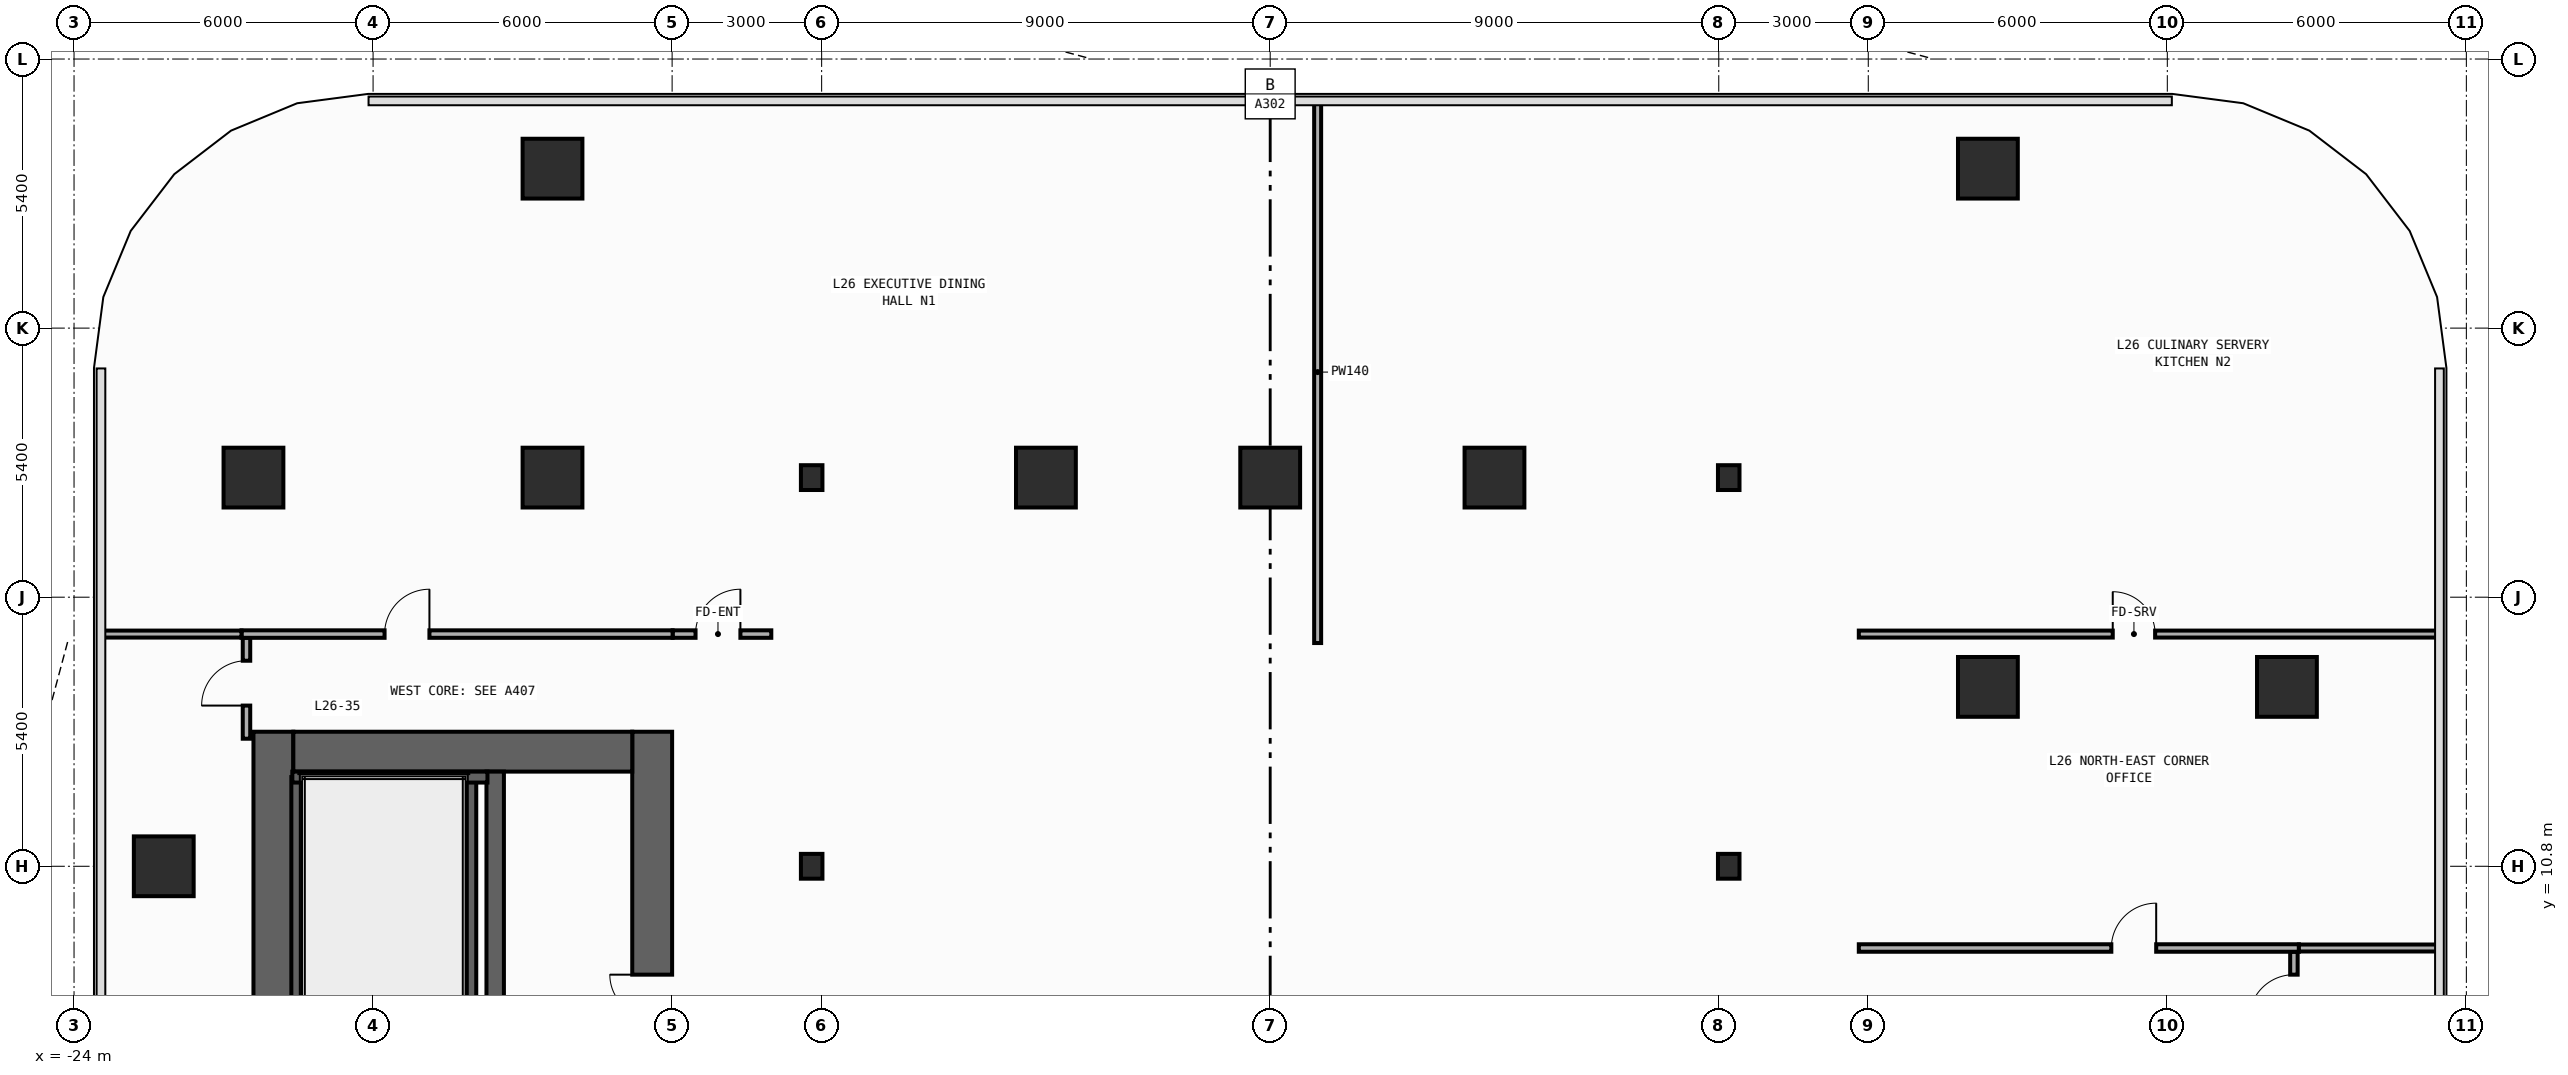
"""IFC4 building model, lengths in metres.
Left out: names, types, materials, properties, quantities, classifications, styles, units other than length and angle.
Written with IfcOpenShell. Run it as: python <this file> out.ifc"""

import sys

from ifc_helpers import new_model, si_unit, direction, frame, frame_2d, origin, origin_2d, place, context, subcontext, project, spatial, rectangle, i_section, extrude, element, fill, save


model = new_model("IFC4")
c1 = context("Model", 3, precision=1e-05, world=origin(), true_north=direction((0.0, 1.0)))
c2 = subcontext(c1, "Body", "Model", "MODEL_VIEW")
j1 = project(units=[si_unit("LENGTHUNIT", "METRE"), si_unit("PLANEANGLEUNIT", "RADIAN")], contexts=[c1])
p1 = place(None, origin())
s1 = spatial("IfcSite", under=j1, at=p1, CompositionType="ELEMENT")
p2 = place(p1, origin())
s2 = spatial("IfcBuilding", under=s1, at=p2, CompositionType="ELEMENT")
p3 = place(p2, frame((0.0, 0.0, 114.2)))
s3 = spatial("IfcBuildingStorey", under=s2, at=p3, CompositionType="ELEMENT", Elevation=114.2)
p4 = place(p3, frame((-20.0, -13.5, 0.0), z_axis=(0.0, 0.0, 1.0), x_axis=(0.0, 1.0, 0.0)))
e1 = element("IfcWall", 1, at=p4, inside=s3, PredefinedType="SHEAR", context=c2, shape_type="SweptSolid", body=[
    extrude(rectangle(XDim=27.0, YDim=0.8, at=frame_2d((13.5, 0.0))), origin(), (0.0, 0.0, 1.0), 3.94),
])
p5 = place(p3, frame((-12.4, -13.5, 0.0), z_axis=(0.0, 0.0, 1.0), x_axis=(0.0, 1.0, 0.0)))
e2 = element("IfcWall", 2, at=p5, inside=s3, PredefinedType="SHEAR", context=c2, shape_type="SweptSolid", body=[
    extrude(rectangle(XDim=27.0, YDim=0.8, at=frame_2d((13.5, 0.0))), origin(), (0.0, 0.0, 1.0), 3.94),
])
p6 = place(p5, frame((10.35, 0.0, 0.0)))
e3 = element("IfcOpeningElement", 3, at=p6, cuts=e2, PredefinedType="OPENING", context=c2, shape_type="SweptSolid", body=[
    extrude(rectangle(XDim=1.1, YDim=2.2, at=frame_2d((0.55, 1.1))), frame((0.0, 0.41, 0.0), z_axis=(0.0, -1.0, 0.0), x_axis=(1.0, 0.0, 0.0)), (0.0, 0.0, 1.0), 0.82),
])
p7 = place(p5, frame((7.15, 0.0, 0.0)))
e4 = element("IfcOpeningElement", 4, at=p7, cuts=e2, PredefinedType="OPENING", context=c2, shape_type="SweptSolid", body=[
    extrude(rectangle(XDim=1.1, YDim=2.2, at=frame_2d((0.55, 1.1))), frame((0.0, 0.41, 0.0), z_axis=(0.0, -1.0, 0.0), x_axis=(1.0, 0.0, 0.0)), (0.0, 0.0, 1.0), 0.82),
])
p8 = place(p5, frame((3.95, 0.0, 0.0)))
e5 = element("IfcOpeningElement", 5, at=p8, cuts=e2, PredefinedType="OPENING", context=c2, shape_type="SweptSolid", body=[
    extrude(rectangle(XDim=1.1, YDim=2.2, at=frame_2d((0.55, 1.1))), frame((0.0, 0.41, 0.0), z_axis=(0.0, -1.0, 0.0), x_axis=(1.0, 0.0, 0.0)), (0.0, 0.0, 1.0), 0.82),
])
p9 = place(p5, frame((15.175, 0.0, 0.0)))
e6 = element("IfcOpeningElement", 6, at=p9, cuts=e2, PredefinedType="OPENING", context=c2, shape_type="SweptSolid", body=[
    extrude(rectangle(XDim=0.85, YDim=2.1, at=frame_2d((0.425, 1.05))), frame((0.0, 0.41, 0.0), z_axis=(0.0, -1.0, 0.0), x_axis=(1.0, 0.0, 0.0)), (0.0, 0.0, 1.0), 0.82),
])
p10 = place(p5, frame((21.275, 0.0, 0.0)))
e7 = element("IfcOpeningElement", 7, at=p10, cuts=e2, PredefinedType="OPENING", context=c2, shape_type="SweptSolid", body=[
    extrude(rectangle(XDim=0.85, YDim=2.1, at=frame_2d((0.425, 1.05))), frame((0.0, 0.41, 0.0), z_axis=(0.0, -1.0, 0.0), x_axis=(1.0, 0.0, 0.0)), (0.0, 0.0, 1.0), 0.82),
])
p11 = place(p5, frame((12.725, 0.0, 0.0)))
e8 = element("IfcOpeningElement", 8, at=p11, cuts=e2, PredefinedType="OPENING", context=c2, shape_type="SweptSolid", body=[
    extrude(rectangle(XDim=1.15, YDim=2.2, at=frame_2d((0.575, 1.1))), frame((0.0, 0.41, 0.0), z_axis=(0.0, -1.0, 0.0), x_axis=(1.0, 0.0, 0.0)), (0.0, 0.0, 1.0), 0.82),
])
p12 = place(p5, frame((1.625, 0.0, 0.0)))
e9 = element("IfcOpeningElement", 9, at=p12, cuts=e2, PredefinedType="OPENING", context=c2, shape_type="SweptSolid", body=[
    extrude(rectangle(XDim=0.85, YDim=2.1, at=frame_2d((0.425, 1.05))), frame((0.0, 0.41, 0.0), z_axis=(0.0, -1.0, 0.0), x_axis=(1.0, 0.0, 0.0)), (0.0, 0.0, 1.0), 0.82),
])
p13 = place(p3, frame((-19.6, 13.1, 0.0), z_axis=(0.0, 0.0, 1.0), x_axis=(1.0, 0.0, 0.0)))
e10 = element("IfcWall", 10, at=p13, inside=s3, PredefinedType="SHEAR", context=c2, shape_type="SweptSolid", body=[
    extrude(rectangle(XDim=6.8, YDim=0.8, at=frame_2d((3.4, 0.0))), origin(), (0.0, 0.0, 1.0), 3.94),
])
p14 = place(p3, frame((-15.55, -12.7, 0.0), z_axis=(0.0, 0.0, 1.0), x_axis=(0.0, 1.0, 0.0)))
e11 = element("IfcWall", 11, at=p14, inside=s3, PredefinedType="SHEAR", context=c2, shape_type="SweptSolid", body=[
    extrude(rectangle(XDim=25.4, YDim=0.35, at=frame_2d((12.7, 0.0))), origin(), (0.0, 0.0, 1.0), 3.94),
])
p15 = place(p14, frame((11.925, 0.0, 0.0)))
e12 = element("IfcOpeningElement", 12, at=p15, cuts=e11, PredefinedType="OPENING", context=c2, shape_type="SweptSolid", body=[
    extrude(rectangle(XDim=1.15, YDim=2.2, at=frame_2d((0.575, 1.1))), frame((0.0, 0.185, 0.0), z_axis=(0.0, -1.0, 0.0), x_axis=(1.0, 0.0, 0.0)), (0.0, 0.0, 1.0), 0.37),
])
p16 = place(p14, frame((0.825, 0.0, 0.0)))
e13 = element("IfcOpeningElement", 13, at=p16, cuts=e11, PredefinedType="OPENING", context=c2, shape_type="SweptSolid", body=[
    extrude(rectangle(XDim=0.85, YDim=2.1, at=frame_2d((0.425, 1.05))), frame((0.0, 0.185, 0.0), z_axis=(0.0, -1.0, 0.0), x_axis=(1.0, 0.0, 0.0)), (0.0, 0.0, 1.0), 0.37),
])
for number, where, z_axis, x_axis in (
    (14, (-16.04, 1.29, 0.0), (0.0, 0.0, 1.0), (0.0, 1.0, 0.0)),
    (15, (-19.53, 1.29, 0.0), (0.0, 0.0, 1.0), (0.0, 1.0, 0.0)),
):
    element("IfcWall", number, at=place(p3, frame(where, z_axis=z_axis, x_axis=x_axis)), inside=s3, PredefinedType="SHEAR", context=c2, shape_type="SweptSolid", body=[
        extrude(rectangle(XDim=11.3, YDim=0.22, at=frame_2d((5.65, 0.0))), origin(), (0.0, 0.0, 1.0), 3.94),
    ])
p17 = place(p3, frame((-19.62, 12.59, 0.0), z_axis=(0.0, 0.0, 1.0), x_axis=(1.0, 0.0, 0.0)))
e16 = element("IfcWall", 16, at=p17, inside=s3, PredefinedType="SHEAR", context=c2, shape_type="SweptSolid", body=[
    extrude(rectangle(XDim=3.915, YDim=0.22, at=frame_2d((1.958, 0.0))), origin(), (0.0, 0.0, 1.0), 3.94),
])
for number, where, z_axis, x_axis in (
    (17, (-9.2, 10.8, 0.0), (0.0, 0.0, 1.0), (1.0, 0.0, 0.0)),
    (18, (-9.2, 18.6, 0.0), (0.0, 0.0, 1.0), (1.0, 0.0, 0.0)),
    (19, (9.2, 10.8, 0.0), (0.0, 0.0, 1.0), (1.0, 0.0, 0.0)),
    (20, (9.2, 18.6, 0.0), (0.0, 0.0, 1.0), (1.0, 0.0, 0.0)),
):
    element("IfcColumn", number, at=place(p3, frame(where, z_axis=z_axis, x_axis=x_axis)), inside=s3, PredefinedType="COLUMN", context=c2, shape_type="SweptSolid", body=[
        extrude(i_section(OverallWidth=0.432, OverallDepth=0.498, WebThickness=0.045, FlangeThickness=0.07, FilletRadius=0.022, at=origin_2d()), origin(), (0.0, 0.0, 1.0), 4.2),
    ])
for number, where, z_axis, x_axis in (
    (21, (-20.4, 18.6, 0.0), (0.0, 0.0, 1.0), (1.0, 0.0, 0.0)),
    (22, (20.4, 14.4, 0.0), (0.0, 0.0, 1.0), (1.0, 0.0, 0.0)),
    (23, (-14.4, 18.6, 0.0), (0.0, 0.0, 1.0), (1.0, 0.0, 0.0)),
    (24, (14.4, 14.4, 0.0), (0.0, 0.0, 1.0), (1.0, 0.0, 0.0)),
    (25, (-4.5, 18.6, 0.0), (0.0, 0.0, 1.0), (1.0, 0.0, 0.0)),
    (26, (0.0, 18.6, 0.0), (0.0, 0.0, 1.0), (1.0, 0.0, 0.0)),
    (27, (4.5, 18.6, 0.0), (0.0, 0.0, 1.0), (1.0, 0.0, 0.0)),
    (28, (-22.2, 10.8, 0.0), (0.0, 0.0, 1.0), (1.0, 0.0, 0.0)),
    (29, (-14.4, 24.8, 0.0), (0.0, 0.0, 1.0), (1.0, 0.0, 0.0)),
    (30, (14.4, 24.8, 0.0), (0.0, 0.0, 1.0), (1.0, 0.0, 0.0)),
):
    element("IfcColumn", number, at=place(p3, frame(where, z_axis=z_axis, x_axis=x_axis)), inside=s3, PredefinedType="COLUMN", context=c2, shape_type="SweptSolid", body=[
        extrude(rectangle(XDim=1.2, YDim=1.2, at=origin_2d()), origin(), (0.0, 0.0, 1.0), 4.2),
    ])
p18 = place(p3, frame((-11.99, 15.46, 0.0), z_axis=(0.0, 0.0, 1.0), x_axis=(1.0, 0.0, 0.0)))
e31 = element("IfcWall", 31, at=p18, inside=s3, PredefinedType="PARTITIONING", context=c2, shape_type="SweptSolid", body=[
    extrude(rectangle(XDim=1.98, YDim=0.15, at=frame_2d((0.99, 0.0))), origin(), (0.0, 0.0, 1.0), 3.94),
])
p19 = place(p18, frame((0.46, 0.0, 0.0)))
e32 = element("IfcOpeningElement", 32, at=p19, cuts=e31, PredefinedType="OPENING", context=c2, shape_type="SweptSolid", body=[
    extrude(rectangle(XDim=0.9, YDim=2.15, at=frame_2d((0.45, 1.075))), frame((0.0, 0.085, 0.0), z_axis=(0.0, -1.0, 0.0), x_axis=(1.0, 0.0, 0.0)), (0.0, 0.0, 1.0), 0.17),
])
p20 = place(p3, frame((-20.54, 13.36, 0.0), z_axis=(0.0, 0.0, 1.0), x_axis=(0.0, 1.0, 0.0)))
e33 = element("IfcWall", 33, at=p20, inside=s3, PredefinedType="PARTITIONING", context=c2, shape_type="SweptSolid", body=[
    extrude(rectangle(XDim=2.025, YDim=0.15, at=frame_2d((1.012, 0.0))), origin(), (0.0, 0.0, 1.0), 3.94),
])
p21 = place(p20, frame((0.665, 0.0, 0.0)))
e34 = element("IfcOpeningElement", 34, at=p21, cuts=e33, PredefinedType="OPENING", context=c2, shape_type="SweptSolid", body=[
    extrude(rectangle(XDim=0.9, YDim=2.15, at=frame_2d((0.45, 1.075))), frame((0.0, 0.085, 0.0), z_axis=(0.0, -1.0, 0.0), x_axis=(1.0, 0.0, 0.0)), (0.0, 0.0, 1.0), 0.17),
])
p22 = place(p3, frame((-20.64, 15.46, 0.0), z_axis=(0.0, 0.0, 1.0), x_axis=(1.0, 0.0, 0.0)))
e35 = element("IfcWall", 35, at=p22, inside=s3, PredefinedType="PARTITIONING", context=c2, shape_type="SweptSolid", body=[
    extrude(rectangle(XDim=8.65, YDim=0.15, at=frame_2d((4.325, 0.0))), origin(), (0.0, 0.0, 1.0), 3.94),
])
p23 = place(p22, frame((2.871, 0.0, 0.0)))
e36 = element("IfcOpeningElement", 36, at=p23, cuts=e35, PredefinedType="OPENING", context=c2, shape_type="SweptSolid", body=[
    extrude(rectangle(XDim=0.9, YDim=2.15, at=frame_2d((0.45, 1.075))), frame((0.0, 0.085, 0.0), z_axis=(0.0, -1.0, 0.0), x_axis=(1.0, 0.0, 0.0)), (0.0, 0.0, 1.0), 0.17),
])
p24 = place(p3, frame((20.54, 7.06, 0.0), z_axis=(0.0, 0.0, 1.0), x_axis=(0.0, 1.0, 0.0)))
e37 = element("IfcWall", 37, at=p24, inside=s3, PredefinedType="PARTITIONING", context=c2, shape_type="SweptSolid", body=[
    extrude(rectangle(XDim=2.025, YDim=0.15, at=frame_2d((1.012, 0.0))), origin(), (0.0, 0.0, 1.0), 3.94),
])
p25 = place(p24, frame((0.665, 0.0, 0.0)))
e38 = element("IfcOpeningElement", 38, at=p25, cuts=e37, PredefinedType="OPENING", context=c2, shape_type="SweptSolid", body=[
    extrude(rectangle(XDim=0.9, YDim=2.15, at=frame_2d((0.45, 1.075))), frame((0.0, 0.085, 0.0), z_axis=(0.0, -1.0, 0.0), x_axis=(1.0, 0.0, 0.0)), (0.0, 0.0, 1.0), 0.17),
])
p26 = place(p3, frame((11.81, 9.16, 0.0), z_axis=(0.0, 0.0, 1.0), x_axis=(1.0, 0.0, 0.0)))
e39 = element("IfcWall", 39, at=p26, inside=s3, PredefinedType="PARTITIONING", context=c2, shape_type="SweptSolid", body=[
    extrude(rectangle(XDim=8.83, YDim=0.15, at=frame_2d((4.415, 0.0))), origin(), (0.0, 0.0, 1.0), 3.94),
])
p27 = place(p26, frame((5.067, 0.0, 0.0)))
e40 = element("IfcOpeningElement", 40, at=p27, cuts=e39, PredefinedType="OPENING", context=c2, shape_type="SweptSolid", body=[
    extrude(rectangle(XDim=0.9, YDim=2.15, at=frame_2d((0.45, 1.075))), frame((0.0, 0.085, 0.0), z_axis=(0.0, -1.0, 0.0), x_axis=(1.0, 0.0, 0.0)), (0.0, 0.0, 1.0), 0.17),
])
for number, where, z_axis, x_axis in (
    (41, (-23.455, 15.46, 0.0), (0.0, 0.0, 1.0), (1.0, 0.0, 0.0)),
    (42, (20.64, 9.16, 0.0), (0.0, 0.0, 1.0), (1.0, 0.0, 0.0)),
):
    element("IfcWall", number, at=place(p3, frame(where, z_axis=z_axis, x_axis=x_axis)), inside=s3, PredefinedType="PARTITIONING", context=c2, shape_type="SweptSolid", body=[
        extrude(rectangle(XDim=2.815, YDim=0.14, at=frame_2d((1.408, 0.0))), origin(), (0.0, 0.0, 1.0), 3.94),
    ])
p28 = place(p3, frame((11.81, 15.46, 0.0), z_axis=(0.0, 0.0, 1.0), x_axis=(1.0, 0.0, 0.0)))
e43 = element("IfcWall", 43, at=p28, inside=s3, PredefinedType="PARTITIONING", context=c2, shape_type="SweptSolid", body=[
    extrude(rectangle(XDim=11.645, YDim=0.14, at=frame_2d((5.823, 0.0))), origin(), (0.0, 0.0, 1.0), 3.94),
])
p29 = place(p28, frame((5.095, 0.0, 0.0)))
e44 = element("IfcOpeningElement", 44, at=p29, cuts=e43, PredefinedType="OPENING", context=c2, shape_type="SweptSolid", body=[
    extrude(rectangle(XDim=0.85, YDim=2.1, at=frame_2d((0.425, 1.05))), frame((0.0, 0.08, 0.0), z_axis=(0.0, -1.0, 0.0), x_axis=(1.0, 0.0, 0.0)), (0.0, 0.0, 1.0), 0.16),
])
p30 = place(p3, frame((0.952, 15.28, 0.0), z_axis=(0.0, 0.0, 1.0), x_axis=(0.0, 1.0, 0.0)))
e45 = element("IfcWall", 45, at=p30, inside=s3, PredefinedType="PARTITIONING", context=c2, shape_type="SweptSolid", body=[
    extrude(rectangle(XDim=10.875, YDim=0.14, at=frame_2d((5.438, 0.0))), origin(), (0.0, 0.0, 1.0), 3.94),
])
p31 = place(p10, origin())
e46 = element("IfcDoor", 46, at=p31, inside=s3, OperationType="SINGLE_SWING_RIGHT", PredefinedType="DOOR", context=c2, shape_type="SweptSolid", body=[
    extrude(rectangle(XDim=0.85, YDim=2.1, at=frame_2d((0.425, 1.05))), frame((0.0, 0.025, 0.0), z_axis=(0.0, -1.0, 0.0), x_axis=(1.0, 0.0, 0.0)), (0.0, 0.0, 1.0), 0.05),
])
fill(e7, e46)
p32 = place(p19, origin())
e47 = element("IfcDoor", 47, at=p32, inside=s3, OperationType="SINGLE_SWING_RIGHT", PredefinedType="DOOR", context=c2, shape_type="SweptSolid", body=[
    extrude(rectangle(XDim=0.9, YDim=2.15, at=frame_2d((0.45, 1.075))), frame((0.0, 0.025, 0.0), z_axis=(0.0, -1.0, 0.0), x_axis=(1.0, 0.0, 0.0)), (0.0, 0.0, 1.0), 0.05),
])
fill(e32, e47)
p33 = place(p21, origin())
e48 = element("IfcDoor", 48, at=p33, inside=s3, OperationType="SINGLE_SWING_LEFT", PredefinedType="DOOR", context=c2, shape_type="SweptSolid", body=[
    extrude(rectangle(XDim=0.9, YDim=2.15, at=frame_2d((0.45, 1.075))), frame((0.0, 0.025, 0.0), z_axis=(0.0, -1.0, 0.0), x_axis=(1.0, 0.0, 0.0)), (0.0, 0.0, 1.0), 0.05),
])
fill(e34, e48)
p34 = place(p23, origin())
e49 = element("IfcDoor", 49, at=p34, inside=s3, OperationType="SINGLE_SWING_RIGHT", PredefinedType="DOOR", context=c2, shape_type="SweptSolid", body=[
    extrude(rectangle(XDim=0.9, YDim=2.15, at=frame_2d((0.45, 1.075))), frame((0.0, 0.025, 0.0), z_axis=(0.0, -1.0, 0.0), x_axis=(1.0, 0.0, 0.0)), (0.0, 0.0, 1.0), 0.05),
])
fill(e36, e49)
p35 = place(p25, origin())
e50 = element("IfcDoor", 50, at=p35, inside=s3, OperationType="SINGLE_SWING_LEFT", PredefinedType="DOOR", context=c2, shape_type="SweptSolid", body=[
    extrude(rectangle(XDim=0.9, YDim=2.15, at=frame_2d((0.45, 1.075))), frame((0.0, 0.025, 0.0), z_axis=(0.0, -1.0, 0.0), x_axis=(1.0, 0.0, 0.0)), (0.0, 0.0, 1.0), 0.05),
])
fill(e38, e50)
p36 = place(p27, origin())
e51 = element("IfcDoor", 51, at=p36, inside=s3, OperationType="SINGLE_SWING_RIGHT", PredefinedType="DOOR", context=c2, shape_type="SweptSolid", body=[
    extrude(rectangle(XDim=0.9, YDim=2.15, at=frame_2d((0.45, 1.075))), frame((0.0, 0.025, 0.0), z_axis=(0.0, -1.0, 0.0), x_axis=(1.0, 0.0, 0.0)), (0.0, 0.0, 1.0), 0.05),
])
fill(e40, e51)
p37 = place(p29, origin())
e52 = element("IfcDoor", 52, at=p37, inside=s3, OperationType="SINGLE_SWING_LEFT", PredefinedType="DOOR", context=c2, shape_type="SweptSolid", body=[
    extrude(rectangle(XDim=0.85, YDim=2.1, at=frame_2d((0.425, 1.05))), frame((0.0, 0.025, 0.0), z_axis=(0.0, -1.0, 0.0), x_axis=(1.0, 0.0, 0.0)), (0.0, 0.0, 1.0), 0.05),
])
fill(e44, e52)
save(model, sys.argv[1])
